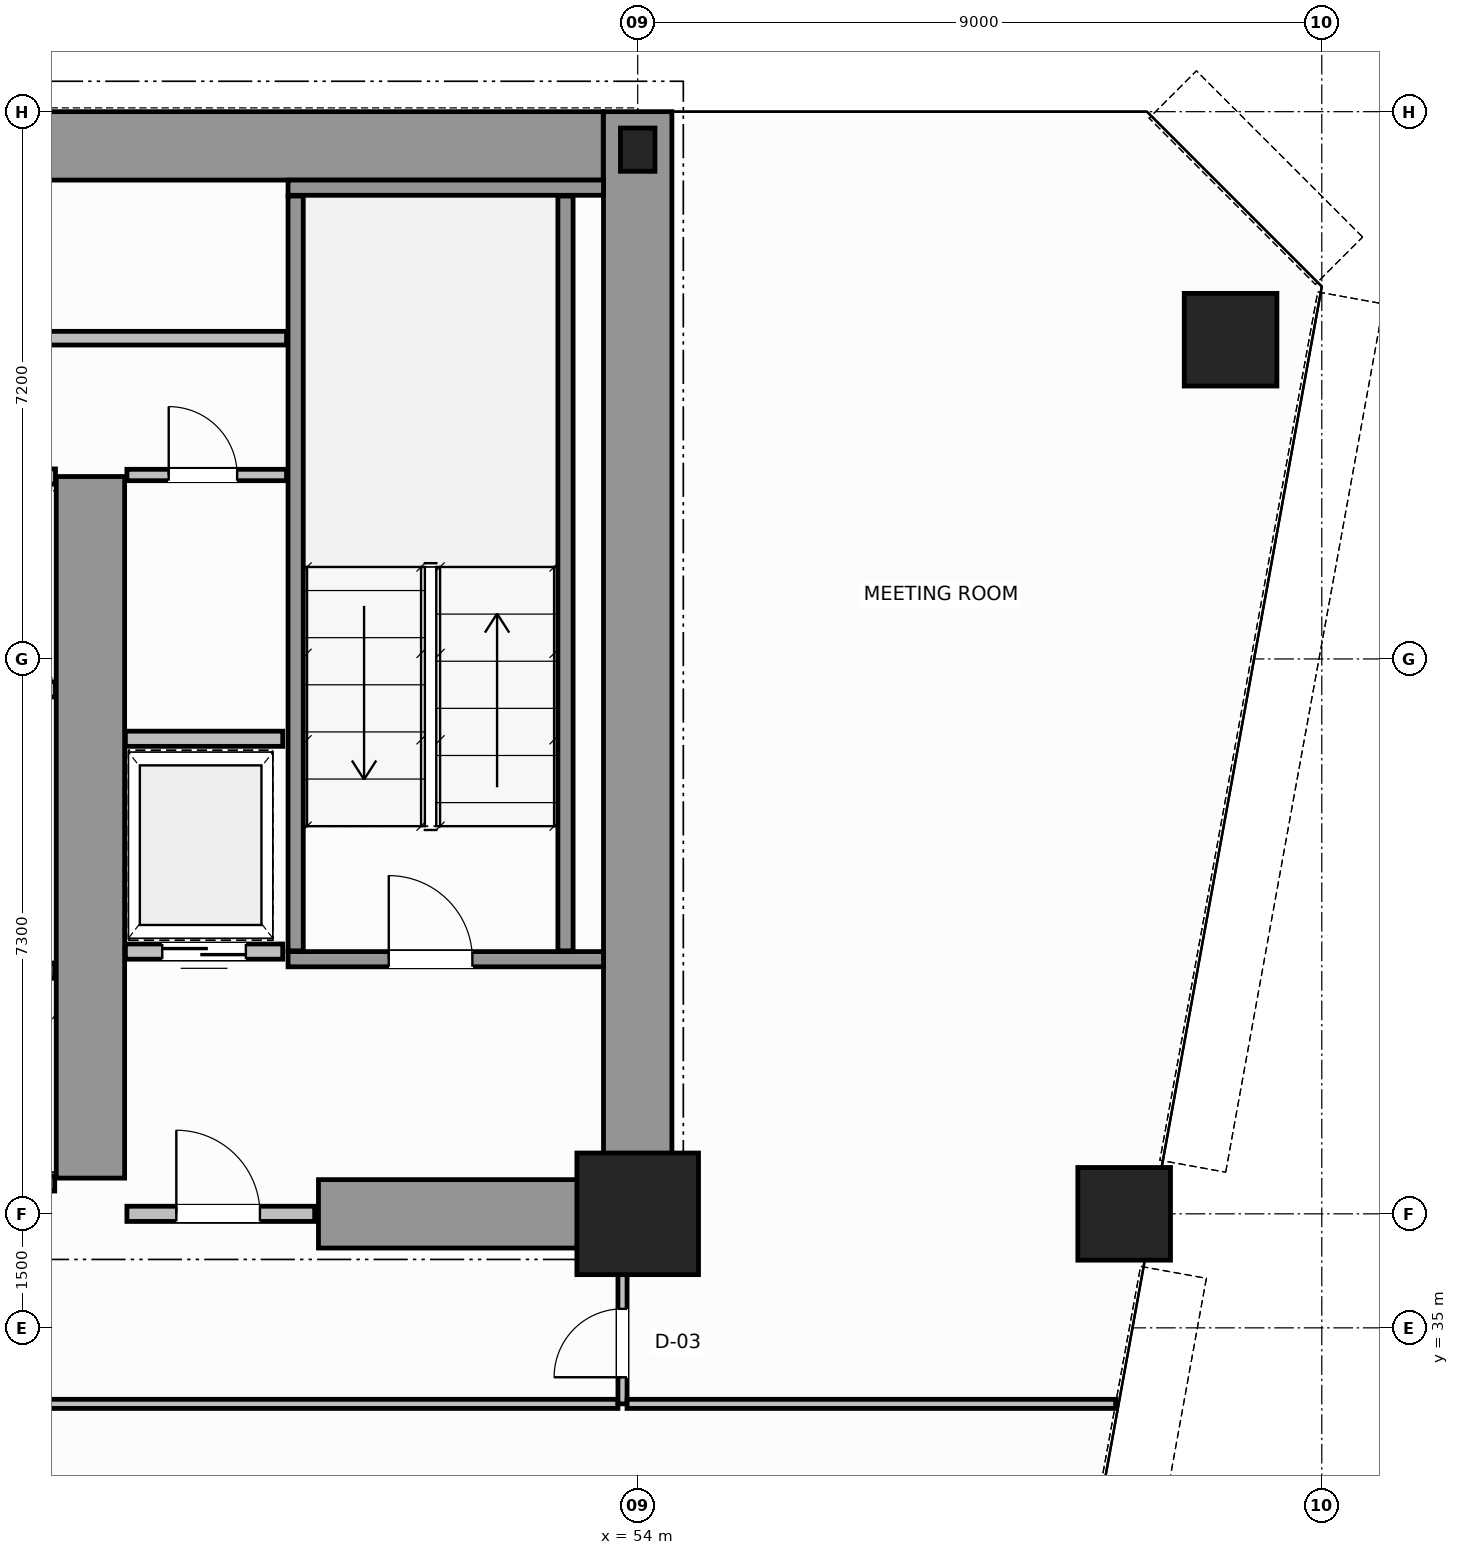
"""IFC4 building model, lengths in metres.
Left out: names, types, materials, properties, quantities, classifications, styles, units other than length and angle.
Written with IfcOpenShell. Run it as: python <this file> out.ifc"""

import sys

from ifc_helpers import new_model, si_unit, direction, frame, frame_2d, origin, origin_2d, place, context, subcontext, project, spatial, rectangle, hollow_circle, i_section, extrude, source, transform, mapped, element, fill, save


model = new_model("IFC4")
c1 = context("Model", 3, precision=1e-05, world=origin(), true_north=direction((0.0, 1.0)))
c2 = subcontext(c1, "Body", "Model", "MODEL_VIEW")
j1 = project(units=[si_unit("LENGTHUNIT", "METRE"), si_unit("PLANEANGLEUNIT", "RADIAN")], contexts=[c1])
p1 = place(None, origin())
s1 = spatial("IfcSite", under=j1, at=p1, CompositionType="ELEMENT")
p2 = place(p1, origin())
s2 = spatial("IfcBuilding", under=s1, at=p2, CompositionType="ELEMENT")
p3 = place(p2, frame((0.0, 0.0, 37.8)))
s3 = spatial("IfcBuildingStorey", under=s2, at=p3, CompositionType="ELEMENT", Elevation=37.8)
m1 = source(origin(), c2, "Body", "SweptSolid", [
    extrude(rectangle(XDim=1.6, YDim=1.6, at=origin_2d()), origin(), (0.0, 0.0, 1.0), 3.8),
])
p4 = place(p3, frame((54.0, 36.5, 0.0), z_axis=(0.0, 0.0, 1.0), x_axis=(1.0, 0.0, 0.0)))
e1 = element("IfcColumn", 1, at=p4, inside=s3, PredefinedType="COLUMN", context=c2, shape_type="MappedRepresentation", body=[
    mapped(m1, transform((0.0, 0.0, 0.0), scale=1.0)),
])
m2 = source(origin(), c2, "Body", "SweptSolid", [
    extrude(i_section(OverallWidth=0.454, OverallDepth=0.569, WebThickness=0.078, FlangeThickness=0.08, FilletRadius=0.015, at=origin_2d()), origin(), (0.0, 0.0, 1.0), 3.8),
])
p5 = place(p3, frame((54.0, 50.5, 0.0), z_axis=(0.0, 0.0, 1.0), x_axis=(1.0, 0.0, 0.0)))
e2 = element("IfcColumn", 2, at=p5, inside=s3, PredefinedType="COLUMN", context=c2, shape_type="MappedRepresentation", body=[
    mapped(m2, transform((0.0, 0.0, 0.0), scale=1.0)),
])
m3 = source(origin(), c2, "Body", "SweptSolid", [
    extrude(hollow_circle(Radius=0.61, WallThickness=0.05, at=origin_2d()), origin(), (0.0, 0.0, 1.0), 3.8),
])
for number, where, z_axis, x_axis in (
    (3, (61.8, 48.0, 0.0), (0.0, 0.0, 1.0), (1.0, 0.0, 0.0)),
    (4, (60.4, 36.5, 0.0), (0.0, 0.0, 1.0), (1.0, 0.0, 0.0)),
):
    element("IfcColumn", number, at=place(p3, frame(where, z_axis=z_axis, x_axis=x_axis)), inside=s3, PredefinedType="COLUMN", context=c2, shape_type="MappedRepresentation", body=[
        mapped(m3, transform((0.0, 0.0, 0.0), scale=1.0)),
    ])
p6 = place(p3, frame((34.002, 50.55, 0.0), z_axis=(0.0, 0.0, 1.0), x_axis=(1.0, 0.0, 0.0)))
e5 = element("IfcWall", 5, at=p6, inside=s3, PredefinedType="SHEAR", context=c2, shape_type="SweptSolid", body=[
    extrude(rectangle(XDim=19.544, YDim=0.9, at=frame_2d((9.772, 0.0))), origin(), (0.0, 0.0, 1.0), 3.8),
])
p7 = place(p3, frame((54.0, 36.5, 0.0), z_axis=(0.0, 0.0, 1.0), x_axis=(0.0, 1.0, 0.0)))
e6 = element("IfcWall", 6, at=p7, inside=s3, PredefinedType="SHEAR", context=c2, shape_type="SweptSolid", body=[
    extrude(rectangle(XDim=14.5, YDim=0.9, at=frame_2d((7.25, 0.0))), origin(), (0.0, 0.0, 1.0), 3.8),
])
p8 = place(p3, frame((49.8, 36.5, 0.0), z_axis=(0.0, 0.0, 1.0), x_axis=(1.0, 0.0, 0.0)))
e7 = element("IfcWall", 7, at=p8, inside=s3, PredefinedType="SHEAR", context=c2, shape_type="SweptSolid", body=[
    extrude(rectangle(XDim=3.73, YDim=0.9, at=frame_2d((1.865, 0.0))), origin(), (0.0, 0.0, 1.0), 2.38),
])
p9 = place(p3, frame((46.8, 36.97, 0.0), z_axis=(0.0, 0.0, 1.0), x_axis=(0.0, 1.0, 0.0)))
e8 = element("IfcWall", 8, at=p9, inside=s3, PredefinedType="SHEAR", context=c2, shape_type="SweptSolid", body=[
    extrude(rectangle(XDim=9.23, YDim=0.9, at=frame_2d((4.615, 0.0))), origin(), (0.0, 0.0, 1.0), 3.8),
])
p10 = place(p3, frame((49.4, 39.85, 0.0), z_axis=(0.0, 0.0, 1.0), x_axis=(1.0, 0.0, 0.0)))
e9 = element("IfcWall", 9, at=p10, inside=s3, PredefinedType="SOLIDWALL", context=c2, shape_type="SweptSolid", body=[
    extrude(rectangle(XDim=4.15, YDim=0.2, at=frame_2d((2.075, 0.0))), origin(), (0.0, 0.0, 1.0), 3.8),
])
p11 = place(p10, frame((1.325, 0.0, 0.0)))
e10 = element("IfcOpeningElement", 10, at=p11, cuts=e9, PredefinedType="OPENING", context=c2, shape_type="SweptSolid", body=[
    extrude(rectangle(XDim=1.1, YDim=2.15, at=frame_2d((0.55, 1.075))), frame((0.0, 0.11, 0.0), z_axis=(0.0, -1.0, 0.0), x_axis=(1.0, 0.0, 0.0)), (0.0, 0.0, 1.0), 0.22),
])
p12 = place(p3, frame((49.4, 50.0, 0.0), z_axis=(0.0, 0.0, 1.0), x_axis=(1.0, 0.0, 0.0)))
e11 = element("IfcWall", 11, at=p12, inside=s3, PredefinedType="SOLIDWALL", context=c2, shape_type="SweptSolid", body=[
    extrude(rectangle(XDim=4.15, YDim=0.2, at=frame_2d((2.075, 0.0))), origin(), (0.0, 0.0, 1.0), 3.8),
])
for number, where, z_axis, x_axis in (
    (12, (49.5, 39.96, 0.0), (0.0, 0.0, 1.0), (0.0, 1.0, 0.0)),
    (13, (53.05, 39.96, 0.0), (0.0, 0.0, 1.0), (0.0, 1.0, 0.0)),
):
    element("IfcWall", number, at=place(p3, frame(where, z_axis=z_axis, x_axis=x_axis)), inside=s3, PredefinedType="SOLIDWALL", context=c2, shape_type="SweptSolid", body=[
        extrude(rectangle(XDim=9.93, YDim=0.2, at=frame_2d((4.965, 0.0))), origin(), (0.0, 0.0, 1.0), 3.8),
    ])
p13 = place(p3, frame((47.28, 36.5, 0.0), z_axis=(0.0, 0.0, 1.0), x_axis=(1.0, 0.0, 0.0)))
e14 = element("IfcWall", 14, at=p13, inside=s3, PredefinedType="SOLIDWALL", context=c2, shape_type="SweptSolid", body=[
    extrude(rectangle(XDim=2.47, YDim=0.2, at=frame_2d((1.235, 0.0))), origin(), (0.0, 0.0, 1.0), 2.37),
])
p14 = place(p13, frame((0.65, 0.0, 0.0)))
e15 = element("IfcOpeningElement", 15, at=p14, cuts=e14, PredefinedType="OPENING", context=c2, shape_type="SweptSolid", body=[
    extrude(rectangle(XDim=1.1, YDim=2.15, at=frame_2d((0.55, 1.075))), frame((0.0, 0.11, 0.0), z_axis=(0.0, -1.0, 0.0), x_axis=(1.0, 0.0, 0.0)), (0.0, 0.0, 1.0), 0.22),
])
p15 = place(p3, frame((44.37, 39.7, 0.0), z_axis=(0.0, 0.0, 1.0), x_axis=(1.0, 0.0, 0.0)))
e16 = element("IfcWall", 16, at=p15, inside=s3, PredefinedType="SOLIDWALL", context=c2, shape_type="SweptSolid", body=[
    extrude(rectangle(XDim=1.96, YDim=0.2, at=frame_2d((0.98, 0.0))), origin(), (0.0, 0.0, 1.0), 3.58),
])
p16 = place(p3, frame((44.37, 36.9, 0.0), z_axis=(0.0, 0.0, 1.0), x_axis=(1.0, 0.0, 0.0)))
e17 = element("IfcWall", 17, at=p16, inside=s3, PredefinedType="SOLIDWALL", context=c2, shape_type="SweptSolid", body=[
    extrude(rectangle(XDim=1.96, YDim=0.2, at=frame_2d((0.98, 0.0))), origin(), (0.0, 0.0, 1.0), 2.37),
])
for number, where, z_axis, x_axis in (
    (18, (44.62, 43.4, 0.0), (0.0, 0.0, 1.0), (1.0, 0.0, 0.0)),
    (19, (44.62, 46.2, 0.0), (0.0, 0.0, 1.0), (1.0, 0.0, 0.0)),
):
    element("IfcWall", number, at=place(p3, frame(where, z_axis=z_axis, x_axis=x_axis)), inside=s3, PredefinedType="SOLIDWALL", context=c2, shape_type="SweptSolid", body=[
        extrude(rectangle(XDim=1.72, YDim=0.2, at=frame_2d((0.86, 0.0))), origin(), (0.0, 0.0, 1.0), 3.58),
    ])
p17 = place(p3, frame((47.26, 39.95, 0.0), z_axis=(0.0, 0.0, 1.0), x_axis=(1.0, 0.0, 0.0)))
e20 = element("IfcWall", 20, at=p17, inside=s3, PredefinedType="SOLIDWALL", context=c2, shape_type="SweptSolid", body=[
    extrude(rectangle(XDim=2.07, YDim=0.2, at=frame_2d((1.035, 0.0))), origin(), (0.0, 0.0, 1.0), 3.58),
])
p18 = place(p17, frame((0.485, 0.0, 0.0)))
e21 = element("IfcOpeningElement", 21, at=p18, cuts=e20, PredefinedType="OPENING", context=c2, shape_type="SweptSolid", body=[
    extrude(rectangle(XDim=1.1, YDim=2.15, at=frame_2d((0.55, 1.075))), frame((0.0, 0.11, 0.0), z_axis=(0.0, -1.0, 0.0), x_axis=(1.0, 0.0, 0.0)), (0.0, 0.0, 1.0), 0.22),
])
p19 = place(p3, frame((47.26, 42.75, 0.0), z_axis=(0.0, 0.0, 1.0), x_axis=(1.0, 0.0, 0.0)))
e22 = element("IfcWall", 22, at=p19, inside=s3, PredefinedType="SOLIDWALL", context=c2, shape_type="SweptSolid", body=[
    extrude(rectangle(XDim=2.07, YDim=0.2, at=frame_2d((1.035, 0.0))), origin(), (0.0, 0.0, 1.0), 3.58),
])
p20 = place(p3, frame((47.28, 46.22, 0.0), z_axis=(0.0, 0.0, 1.0), x_axis=(1.0, 0.0, 0.0)))
e23 = element("IfcWall", 23, at=p20, inside=s3, PredefinedType="PARTITIONING", context=c2, shape_type="SweptSolid", body=[
    extrude(rectangle(XDim=2.1, YDim=0.15, at=frame_2d((1.05, 0.0))), origin(), (0.0, 0.0, 1.0), 3.58),
])
p21 = place(p20, frame((0.55, 0.0, 0.0)))
e24 = element("IfcOpeningElement", 24, at=p21, cuts=e23, PredefinedType="OPENING", context=c2, shape_type="SweptSolid", body=[
    extrude(rectangle(XDim=0.9, YDim=2.1, at=frame_2d((0.45, 1.05))), frame((0.0, 0.085, 0.0), z_axis=(0.0, -1.0, 0.0), x_axis=(1.0, 0.0, 0.0)), (0.0, 0.0, 1.0), 0.17),
])
p22 = place(p3, frame((18.62, 48.02, 0.0), z_axis=(0.0, 0.0, 1.0), x_axis=(1.0, 0.0, 0.0)))
e25 = element("IfcWall", 25, at=p22, inside=s3, PredefinedType="PLUMBINGWALL", context=c2, shape_type="SweptSolid", body=[
    extrude(rectangle(XDim=30.76, YDim=0.18, at=frame_2d((15.38, 0.0))), origin(), (0.0, 0.0, 1.0), 3.58),
])
p23 = place(p22, frame((1.955, 0.0, 0.0)))
e26 = element("IfcOpeningElement", 26, at=p23, cuts=e25, PredefinedType="OPENING", context=c2, shape_type="SweptSolid", body=[
    extrude(rectangle(XDim=0.9, YDim=2.15, at=frame_2d((0.45, 1.075))), frame((0.0, 0.1, 0.0), z_axis=(0.0, -1.0, 0.0), x_axis=(1.0, 0.0, 0.0)), (0.0, 0.0, 1.0), 0.2),
])
p24 = place(p22, frame((8.03, 0.0, 0.0)))
e27 = element("IfcOpeningElement", 27, at=p24, cuts=e25, PredefinedType="OPENING", context=c2, shape_type="SweptSolid", body=[
    extrude(rectangle(XDim=0.9, YDim=2.15, at=frame_2d((0.45, 1.075))), frame((0.0, 0.1, 0.0), z_axis=(0.0, -1.0, 0.0), x_axis=(1.0, 0.0, 0.0)), (0.0, 0.0, 1.0), 0.2),
])
p25 = place(p22, frame((16.93, 0.0, 0.0)))
e28 = element("IfcOpeningElement", 28, at=p25, cuts=e25, PredefinedType="OPENING", context=c2, shape_type="SweptSolid", body=[
    extrude(rectangle(XDim=0.9, YDim=2.15, at=frame_2d((0.45, 1.075))), frame((0.0, 0.1, 0.0), z_axis=(0.0, -1.0, 0.0), x_axis=(1.0, 0.0, 0.0)), (0.0, 0.0, 1.0), 0.2),
])
p26 = place(p22, frame((26.205, 0.0, 0.0)))
e29 = element("IfcOpeningElement", 29, at=p26, cuts=e25, PredefinedType="OPENING", context=c2, shape_type="SweptSolid", body=[
    extrude(rectangle(XDim=0.9, YDim=2.15, at=frame_2d((0.45, 1.075))), frame((0.0, 0.1, 0.0), z_axis=(0.0, -1.0, 0.0), x_axis=(1.0, 0.0, 0.0)), (0.0, 0.0, 1.0), 0.2),
])
p27 = place(p3, frame((35.66, 34.0, 0.0), z_axis=(0.0, 0.0, 1.0), x_axis=(1.0, 0.0, 0.0)))
e30 = element("IfcWall", 30, at=p27, inside=s3, PredefinedType="PARTITIONING", context=c2, shape_type="SweptSolid", body=[
    extrude(rectangle(XDim=18.08, YDim=0.12, at=frame_2d((9.04, 0.0))), origin(), (0.0, 0.0, 1.0), 3.58),
])
p28 = place(p3, frame((53.8, 34.0, 0.0), z_axis=(0.0, 0.0, 1.0), x_axis=(0.0, 1.0, 0.0)))
e31 = element("IfcWall", 31, at=p28, inside=s3, PredefinedType="PARTITIONING", context=c2, shape_type="SweptSolid", body=[
    extrude(rectangle(XDim=2.44, YDim=0.12, at=frame_2d((1.22, 0.0))), origin(), (0.0, 0.0, 1.0), 3.58),
])
p29 = place(p28, frame((0.35, 0.0, 0.0)))
e32 = element("IfcOpeningElement", 32, at=p29, cuts=e31, PredefinedType="OPENING", context=c2, shape_type="SweptSolid", body=[
    extrude(rectangle(XDim=0.9, YDim=2.15, at=frame_2d((0.45, 1.075))), frame((0.0, 0.07, 0.0), z_axis=(0.0, -1.0, 0.0), x_axis=(1.0, 0.0, 0.0)), (0.0, 0.0, 1.0), 0.14),
])
p30 = place(p3, frame((53.86, 34.0, 0.0), z_axis=(0.0, 0.0, 1.0), x_axis=(1.0, 0.0, 0.0)))
e33 = element("IfcWall", 33, at=p30, inside=s3, PredefinedType="PARTITIONING", context=c2, shape_type="SweptSolid", body=[
    extrude(rectangle(XDim=6.427, YDim=0.12, at=frame_2d((3.214, 0.0))), origin(), (0.0, 0.0, 1.0), 3.58),
])
m4 = source(origin(), c2, "Body", "SweptSolid", [
    extrude(rectangle(XDim=1.1, YDim=2.15, at=frame_2d((0.55, 1.075))), frame((0.0, 0.025, 0.0), z_axis=(0.0, -1.0, 0.0), x_axis=(1.0, 0.0, 0.0)), (0.0, 0.0, 1.0), 0.05),
])
p31 = place(p11, origin())
e34 = element("IfcDoor", 34, at=p31, inside=s3, OperationType="SINGLE_SWING_RIGHT", PredefinedType="DOOR", context=c2, shape_type="MappedRepresentation", body=[
    mapped(m4, transform((0.0, 0.0, 0.0), scale=1.0)),
])
fill(e10, e34)
p32 = place(p14, origin())
e35 = element("IfcDoor", 35, at=p32, inside=s3, OperationType="SINGLE_SWING_LEFT", PredefinedType="DOOR", context=c2, shape_type="MappedRepresentation", body=[
    mapped(m4, transform((0.0, 0.0, 0.0), scale=1.0)),
])
fill(e15, e35)
p33 = place(p18, origin())
e36 = element("IfcDoor", 36, at=p33, inside=s3, OperationType="DOUBLE_DOOR_SLIDING", PredefinedType="DOOR", context=c2, shape_type="MappedRepresentation", body=[
    mapped(m4, transform((0.0, 0.0, 0.0), scale=1.0)),
])
fill(e21, e36)
m5 = source(origin(), c2, "Body", "SweptSolid", [
    extrude(rectangle(XDim=0.9, YDim=2.1, at=frame_2d((0.45, 1.05))), frame((0.0, 0.025, 0.0), z_axis=(0.0, -1.0, 0.0), x_axis=(1.0, 0.0, 0.0)), (0.0, 0.0, 1.0), 0.05),
])
p34 = place(p21, origin())
e37 = element("IfcDoor", 37, at=p34, inside=s3, OperationType="SINGLE_SWING_RIGHT", PredefinedType="DOOR", context=c2, shape_type="MappedRepresentation", body=[
    mapped(m5, transform((0.0, 0.0, 0.0), scale=1.0)),
])
fill(e24, e37)
m6 = source(origin(), c2, "Body", "SweptSolid", [
    extrude(rectangle(XDim=0.9, YDim=2.15, at=frame_2d((0.45, 1.075))), frame((0.0, 0.025, 0.0), z_axis=(0.0, -1.0, 0.0), x_axis=(1.0, 0.0, 0.0)), (0.0, 0.0, 1.0), 0.05),
])
p35 = place(p29, origin())
e38 = element("IfcDoor", 38, at=p35, inside=s3, OperationType="SINGLE_SWING_RIGHT", PredefinedType="DOOR", context=c2, shape_type="MappedRepresentation", body=[
    mapped(m6, transform((0.0, 0.0, 0.0), scale=1.0)),
])
fill(e32, e38)
save(model, sys.argv[1])
